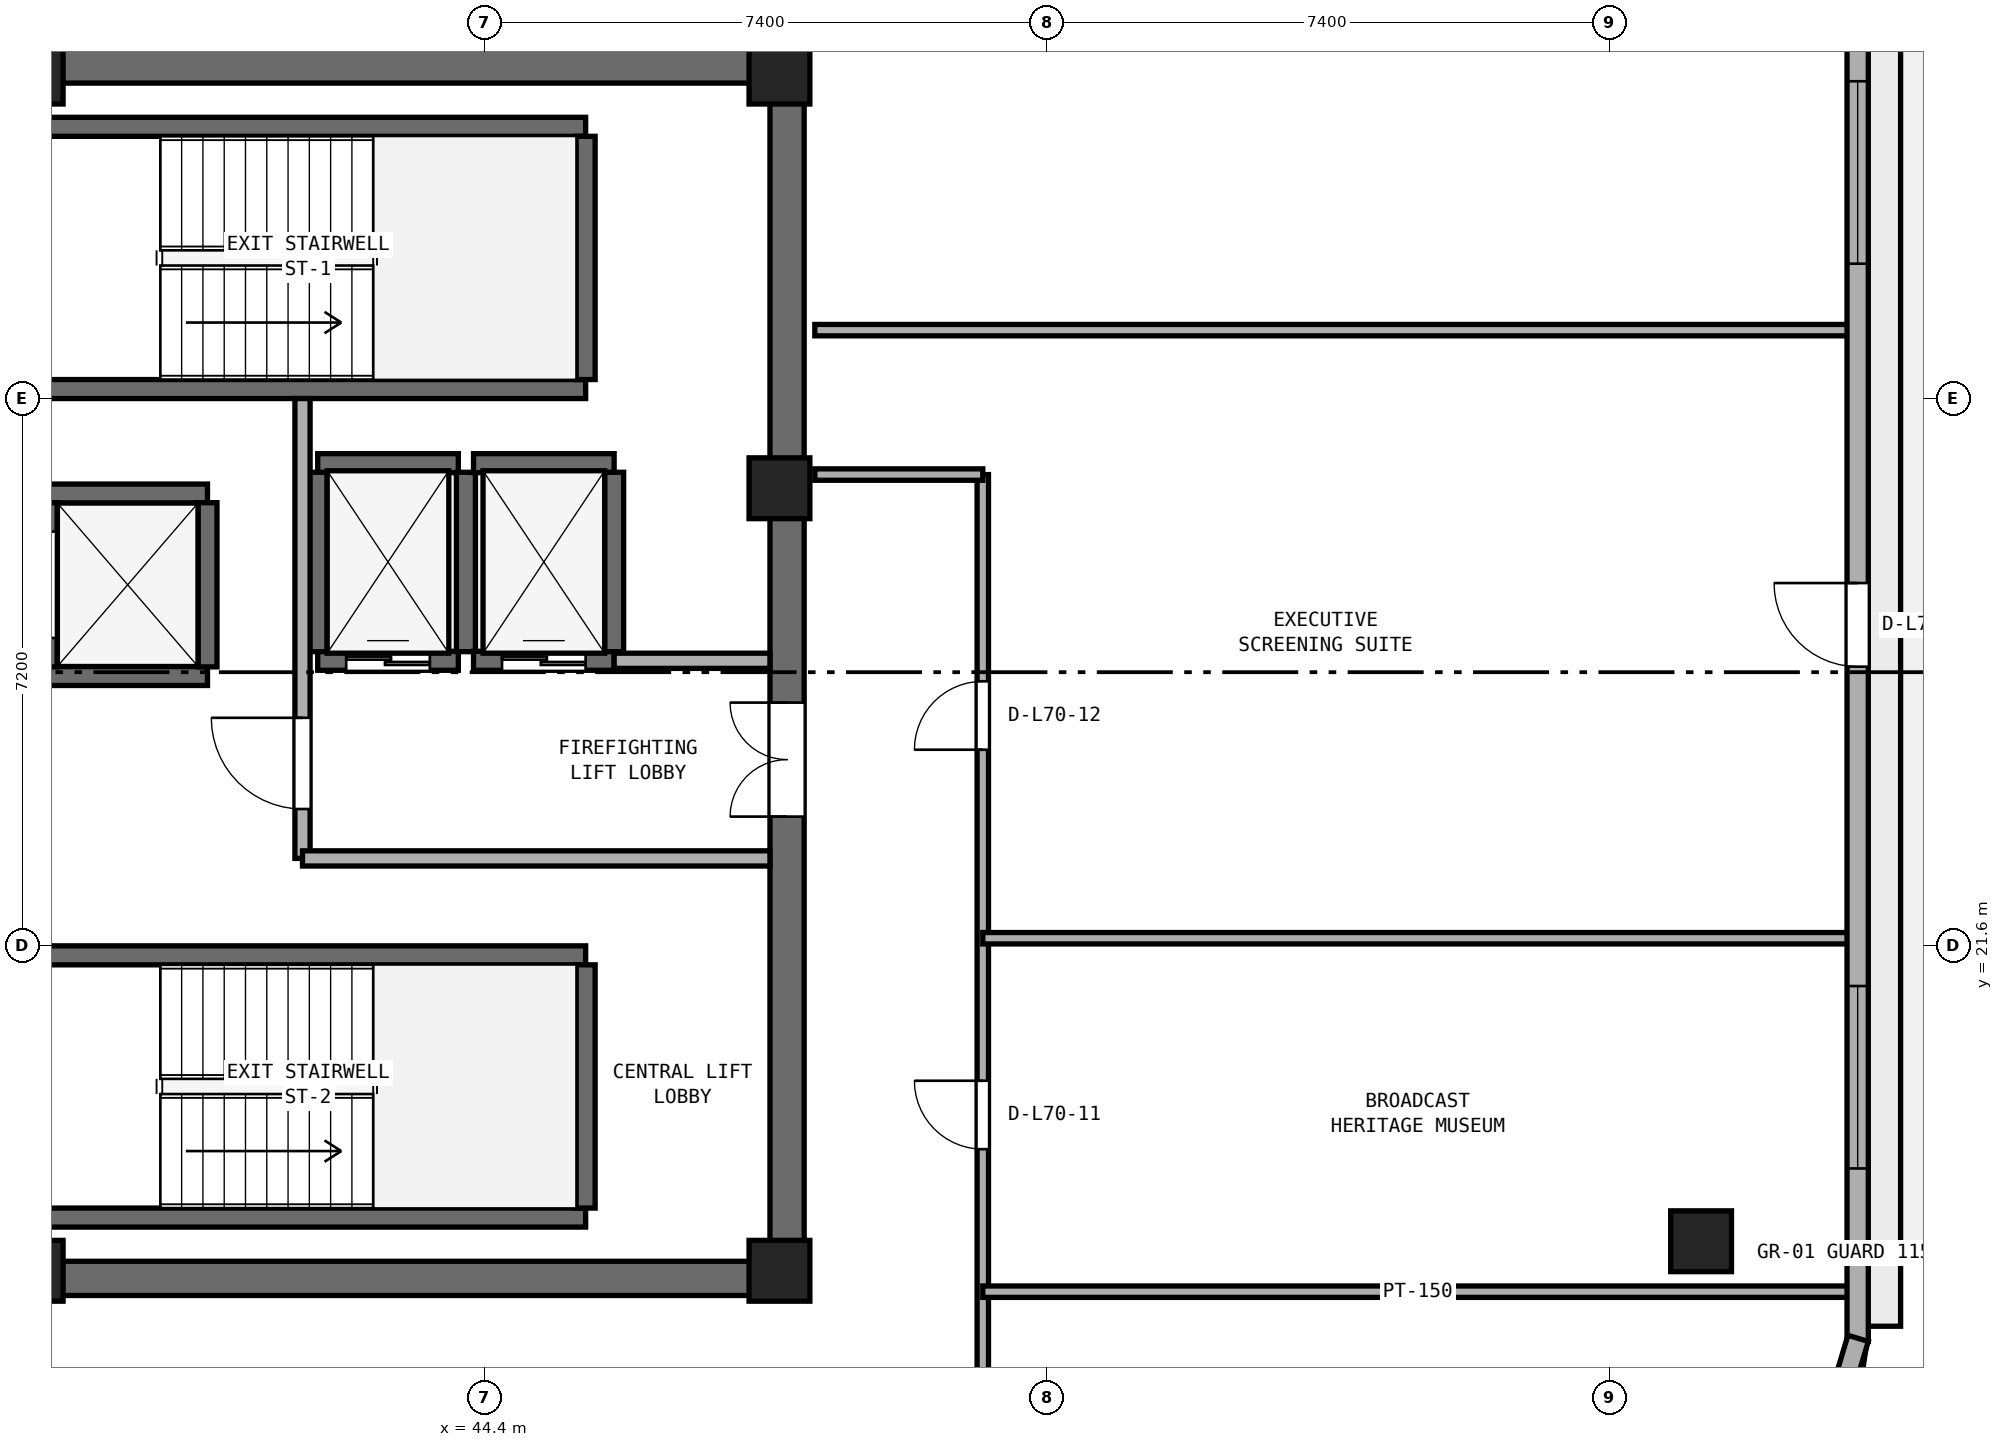
"""IFC4 building model, lengths in metres.
Left out: names, types, materials, properties, quantities, classifications, styles, units other than length and angle.
Written with IfcOpenShell. Run it as: python <this file> out.ifc"""

import sys

from ifc_helpers import new_model, si_unit, direction, frame, frame_2d, origin, origin_2d, place, context, subcontext, project, spatial, rectangle, extrude, element, fill, save


model = new_model("IFC4")
c1 = context("Model", 3, precision=1e-05, world=origin(), true_north=direction((0.0, 1.0)))
c2 = subcontext(c1, "Body", "Model", "MODEL_VIEW")
j1 = project(units=[si_unit("LENGTHUNIT", "METRE"), si_unit("PLANEANGLEUNIT", "RADIAN")], contexts=[c1])
p1 = place(None, origin())
s1 = spatial("IfcSite", under=j1, at=p1, CompositionType="ELEMENT")
p2 = place(p1, origin())
s2 = spatial("IfcBuilding", under=s1, at=p2, CompositionType="ELEMENT")
p3 = place(p2, frame((0.0, 0.0, 274.4)))
s3 = spatial("IfcBuildingStorey", under=s2, at=p3, CompositionType="ELEMENT", Elevation=274.4)
for number, where, z_axis, x_axis in (
    (1, (25.4, 17.225, 0.0), (0.0, 0.0, 1.0), (1.0, 0.0, 0.0)),
    (2, (25.4, 33.175, 0.0), (0.0, 0.0, 1.0), (1.0, 0.0, 0.0)),
):
    element("IfcWall", number, at=place(p3, frame(where, z_axis=z_axis, x_axis=x_axis)), inside=s3, PredefinedType="SHEAR", context=c2, shape_type="SweptSolid", body=[
        extrude(rectangle(XDim=23.2, YDim=0.45, at=frame_2d((11.6, 0.0))), origin(), (0.0, 0.0, 1.0), 3.54),
    ])
p4 = place(p3, frame((48.375, 17.45, 0.0), z_axis=(0.0, 0.0, 1.0), x_axis=(0.0, 1.0, 0.0)))
e3 = element("IfcWall", 3, at=p4, inside=s3, PredefinedType="SHEAR", context=c2, shape_type="SweptSolid", body=[
    extrude(rectangle(XDim=15.5, YDim=0.45, at=frame_2d((7.75, 0.0))), origin(), (0.0, 0.0, 1.0), 3.54),
])
p5 = place(p4, frame((5.85, 0.0, 0.0)))
e4 = element("IfcOpeningElement", 4, at=p5, cuts=e3, PredefinedType="OPENING", context=c2, shape_type="SweptSolid", body=[
    extrude(rectangle(XDim=1.5, YDim=2.15, at=frame_2d((0.75, 1.075))), frame((0.0, 0.235, 0.0), z_axis=(0.0, -1.0, 0.0), x_axis=(1.0, 0.0, 0.0)), (0.0, 0.0, 1.0), 0.47),
])
for number, where, z_axis, x_axis in (
    (5, (38.45, 17.325, 0.0), (0.0, 0.0, 1.0), (1.0, 0.0, 0.0)),
    (6, (48.275, 17.325, 0.0), (0.0, 0.0, 1.0), (1.0, 0.0, 0.0)),
    (7, (48.275, 27.62, 0.0), (0.0, 0.0, 1.0), (1.0, 0.0, 0.0)),
    (8, (48.275, 33.075, 0.0), (0.0, 0.0, 1.0), (1.0, 0.0, 0.0)),
    (9, (38.45, 33.075, 0.0), (0.0, 0.0, 1.0), (1.0, 0.0, 0.0)),
):
    element("IfcColumn", number, at=place(p3, frame(where, z_axis=z_axis, x_axis=x_axis)), inside=s3, PredefinedType="PILASTER", context=c2, shape_type="SweptSolid", body=[
        extrude(rectangle(XDim=0.8, YDim=0.8, at=origin_2d()), origin(), (0.0, 0.0, 1.0), 3.8),
    ])
p6 = place(p3, frame((60.4, 17.714, 0.0), z_axis=(0.0, 0.0, 1.0), x_axis=(1.0, 0.0, 0.0)))
e10 = element("IfcColumn", 10, at=p6, inside=s3, PredefinedType="COLUMN", context=c2, shape_type="SweptSolid", body=[
    extrude(rectangle(XDim=0.8, YDim=0.8, at=origin_2d()), origin(), (0.0, 0.0, 1.0), 3.8),
])
for number, where, z_axis, x_axis in (
    (11, (38.425, 28.925, 0.0), (0.0, 0.0, 1.0), (1.0, 0.0, 0.0)),
    (12, (38.425, 32.375, 0.0), (0.0, 0.0, 1.0), (1.0, 0.0, 0.0)),
):
    element("IfcWall", number, at=place(p3, frame(where, z_axis=z_axis, x_axis=x_axis)), inside=s3, PredefinedType="SHEAR", context=c2, shape_type="SweptSolid", body=[
        extrude(rectangle(XDim=7.3, YDim=0.25, at=frame_2d((3.65, 0.0))), origin(), (0.0, 0.0, 1.0), 3.54),
    ])
p7 = place(p3, frame((45.725, 29.05, 0.0), z_axis=(0.0, 0.0, 1.0), x_axis=(0.0, 1.0, 0.0)))
e13 = element("IfcWall", 13, at=p7, inside=s3, PredefinedType="SHEAR", context=c2, shape_type="SweptSolid", body=[
    extrude(rectangle(XDim=3.2, YDim=0.25, at=frame_2d((1.6, 0.0))), origin(), (0.0, 0.0, 1.0), 3.54),
])
for number, where, z_axis, x_axis in (
    (14, (38.425, 18.025, 0.0), (0.0, 0.0, 1.0), (1.0, 0.0, 0.0)),
    (15, (38.425, 21.475, 0.0), (0.0, 0.0, 1.0), (1.0, 0.0, 0.0)),
):
    element("IfcWall", number, at=place(p3, frame(where, z_axis=z_axis, x_axis=x_axis)), inside=s3, PredefinedType="SHEAR", context=c2, shape_type="SweptSolid", body=[
        extrude(rectangle(XDim=7.3, YDim=0.25, at=frame_2d((3.65, 0.0))), origin(), (0.0, 0.0, 1.0), 3.54),
    ])
p8 = place(p3, frame((45.725, 18.15, 0.0), z_axis=(0.0, 0.0, 1.0), x_axis=(0.0, 1.0, 0.0)))
e16 = element("IfcWall", 16, at=p8, inside=s3, PredefinedType="SHEAR", context=c2, shape_type="SweptSolid", body=[
    extrude(rectangle(XDim=3.2, YDim=0.25, at=frame_2d((1.6, 0.0))), origin(), (0.0, 0.0, 1.0), 3.54),
])
p9 = place(p3, frame((42.2, 25.35, 0.0), z_axis=(0.0, 0.0, 1.0), x_axis=(1.0, 0.0, 0.0)))
e17 = element("IfcWall", 17, at=p9, inside=s3, PredefinedType="SHEAR", context=c2, shape_type="SweptSolid", body=[
    extrude(rectangle(XDim=1.85, YDim=0.25, at=frame_2d((0.925, 0.0))), origin(), (0.0, 0.0, 1.0), 3.54),
])
p10 = place(p9, frame((0.375, 0.0, 0.0)))
e18 = element("IfcOpeningElement", 18, at=p10, cuts=e17, PredefinedType="OPENING", context=c2, shape_type="SweptSolid", body=[
    extrude(rectangle(XDim=1.1, YDim=2.15, at=frame_2d((0.55, 1.075))), frame((0.0, 0.135, 0.0), z_axis=(0.0, -1.0, 0.0), x_axis=(1.0, 0.0, 0.0)), (0.0, 0.0, 1.0), 0.27),
])
p11 = place(p3, frame((42.2, 27.95, 0.0), z_axis=(0.0, 0.0, 1.0), x_axis=(1.0, 0.0, 0.0)))
e19 = element("IfcWall", 19, at=p11, inside=s3, PredefinedType="SHEAR", context=c2, shape_type="SweptSolid", body=[
    extrude(rectangle(XDim=1.85, YDim=0.25, at=frame_2d((0.925, 0.0))), origin(), (0.0, 0.0, 1.0), 3.54),
])
for number, where, z_axis, x_axis in (
    (20, (42.2, 25.47, 0.0), (0.0, 0.0, 1.0), (0.0, 1.0, 0.0)),
    (21, (44.15, 25.47, 0.0), (0.0, 0.0, 1.0), (0.0, 1.0, 0.0)),
):
    element("IfcWall", number, at=place(p3, frame(where, z_axis=z_axis, x_axis=x_axis)), inside=s3, PredefinedType="SHEAR", context=c2, shape_type="SweptSolid", body=[
        extrude(rectangle(XDim=2.36, YDim=0.25, at=frame_2d((1.18, 0.0))), origin(), (0.0, 0.0, 1.0), 3.54),
    ])
p12 = place(p3, frame((44.25, 25.35, 0.0), z_axis=(0.0, 0.0, 1.0), x_axis=(1.0, 0.0, 0.0)))
e22 = element("IfcWall", 22, at=p12, inside=s3, PredefinedType="SHEAR", context=c2, shape_type="SweptSolid", body=[
    extrude(rectangle(XDim=1.85, YDim=0.25, at=frame_2d((0.925, 0.0))), origin(), (0.0, 0.0, 1.0), 3.54),
])
p13 = place(p12, frame((0.375, 0.0, 0.0)))
e23 = element("IfcOpeningElement", 23, at=p13, cuts=e22, PredefinedType="OPENING", context=c2, shape_type="SweptSolid", body=[
    extrude(rectangle(XDim=1.1, YDim=2.15, at=frame_2d((0.55, 1.075))), frame((0.0, 0.135, 0.0), z_axis=(0.0, -1.0, 0.0), x_axis=(1.0, 0.0, 0.0)), (0.0, 0.0, 1.0), 0.27),
])
p14 = place(p3, frame((44.25, 27.95, 0.0), z_axis=(0.0, 0.0, 1.0), x_axis=(1.0, 0.0, 0.0)))
e24 = element("IfcWall", 24, at=p14, inside=s3, PredefinedType="SHEAR", context=c2, shape_type="SweptSolid", body=[
    extrude(rectangle(XDim=1.85, YDim=0.25, at=frame_2d((0.925, 0.0))), origin(), (0.0, 0.0, 1.0), 3.54),
])
p15 = place(p3, frame((46.1, 25.47, 0.0), z_axis=(0.0, 0.0, 1.0), x_axis=(0.0, 1.0, 0.0)))
e25 = element("IfcWall", 25, at=p15, inside=s3, PredefinedType="SHEAR", context=c2, shape_type="SweptSolid", body=[
    extrude(rectangle(XDim=2.36, YDim=0.25, at=frame_2d((1.18, 0.0))), origin(), (0.0, 0.0, 1.0), 3.54),
])
for number, where, z_axis, x_axis in (
    (26, (38.65, 25.15, 0.0), (0.0, 0.0, 1.0), (1.0, 0.0, 0.0)),
    (27, (38.65, 27.55, 0.0), (0.0, 0.0, 1.0), (1.0, 0.0, 0.0)),
):
    element("IfcWall", number, at=place(p3, frame(where, z_axis=z_axis, x_axis=x_axis)), inside=s3, PredefinedType="SHEAR", context=c2, shape_type="SweptSolid", body=[
        extrude(rectangle(XDim=2.1, YDim=0.25, at=frame_2d((1.05, 0.0))), origin(), (0.0, 0.0, 1.0), 3.54),
    ])
p16 = place(p3, frame((38.65, 25.27, 0.0), z_axis=(0.0, 0.0, 1.0), x_axis=(0.0, 1.0, 0.0)))
e28 = element("IfcWall", 28, at=p16, inside=s3, PredefinedType="SHEAR", context=c2, shape_type="SweptSolid", body=[
    extrude(rectangle(XDim=2.16, YDim=0.25, at=frame_2d((1.08, 0.0))), origin(), (0.0, 0.0, 1.0), 3.54),
])
p17 = place(p16, frame((0.38, 0.0, 0.0)))
e29 = element("IfcOpeningElement", 29, at=p17, cuts=e28, PredefinedType="OPENING", context=c2, shape_type="SweptSolid", body=[
    extrude(rectangle(XDim=1.4, YDim=2.2, at=frame_2d((0.7, 1.1))), frame((0.0, 0.135, 0.0), z_axis=(0.0, -1.0, 0.0), x_axis=(1.0, 0.0, 0.0)), (0.0, 0.0, 1.0), 0.27),
])
p18 = place(p3, frame((40.75, 25.27, 0.0), z_axis=(0.0, 0.0, 1.0), x_axis=(0.0, 1.0, 0.0)))
e30 = element("IfcWall", 30, at=p18, inside=s3, PredefinedType="SHEAR", context=c2, shape_type="SweptSolid", body=[
    extrude(rectangle(XDim=2.16, YDim=0.25, at=frame_2d((1.08, 0.0))), origin(), (0.0, 0.0, 1.0), 3.54),
])
p19 = place(p3, frame((42.0, 22.75, 0.0), z_axis=(0.0, 0.0, 1.0), x_axis=(0.0, 1.0, 0.0)))
e31 = element("IfcWall", 31, at=p19, inside=s3, PredefinedType="SOLIDWALL", context=c2, shape_type="SweptSolid", body=[
    extrude(rectangle(XDim=6.05, YDim=0.2, at=frame_2d((3.025, 0.0))), origin(), (0.0, 0.0, 1.0), 3.54),
])
p20 = place(p19, frame((0.65, 0.0, 0.0)))
e32 = element("IfcOpeningElement", 32, at=p20, cuts=e31, PredefinedType="OPENING", context=c2, shape_type="SweptSolid", body=[
    extrude(rectangle(XDim=1.2, YDim=2.15, at=frame_2d((0.6, 1.075))), frame((0.0, 0.11, 0.0), z_axis=(0.0, -1.0, 0.0), x_axis=(1.0, 0.0, 0.0)), (0.0, 0.0, 1.0), 0.22),
])
p21 = place(p3, frame((42.0, 22.75, 0.0), z_axis=(0.0, 0.0, 1.0), x_axis=(1.0, 0.0, 0.0)))
e33 = element("IfcWall", 33, at=p21, inside=s3, PredefinedType="SOLIDWALL", context=c2, shape_type="SweptSolid", body=[
    extrude(rectangle(XDim=6.15, YDim=0.2, at=frame_2d((3.075, 0.0))), origin(), (0.0, 0.0, 1.0), 3.54),
])
p22 = place(p3, frame((46.1, 25.35, 0.0), z_axis=(0.0, 0.0, 1.0), x_axis=(1.0, 0.0, 0.0)))
e34 = element("IfcWall", 34, at=p22, inside=s3, PredefinedType="SOLIDWALL", context=c2, shape_type="SweptSolid", body=[
    extrude(rectangle(XDim=2.05, YDim=0.2, at=frame_2d((1.025, 0.0))), origin(), (0.0, 0.0, 1.0), 3.54),
])
p23 = place(p3, frame((50.95, 14.65, 0.0), z_axis=(0.0, 0.0, 1.0), x_axis=(0.0, 1.0, 0.0)))
e35 = element("IfcWall", 35, at=p23, inside=s3, PredefinedType="PARTITIONING", context=c2, shape_type="SweptSolid", body=[
    extrude(rectangle(XDim=13.15, YDim=0.15, at=frame_2d((6.575, 0.0))), origin(), (0.0, 0.0, 1.0), 3.54),
])
p24 = place(p23, frame((4.275, 0.0, 0.0)))
e36 = element("IfcOpeningElement", 36, at=p24, cuts=e35, PredefinedType="OPENING", context=c2, shape_type="SweptSolid", body=[
    extrude(rectangle(XDim=0.9, YDim=2.1, at=frame_2d((0.45, 1.05))), frame((0.0, 0.085, 0.0), z_axis=(0.0, -1.0, 0.0), x_axis=(1.0, 0.0, 0.0)), (0.0, 0.0, 1.0), 0.17),
])
p25 = place(p23, frame((9.53, 0.0, 0.0)))
e37 = element("IfcOpeningElement", 37, at=p25, cuts=e35, PredefinedType="OPENING", context=c2, shape_type="SweptSolid", body=[
    extrude(rectangle(XDim=0.9, YDim=2.1, at=frame_2d((0.45, 1.05))), frame((0.0, 0.085, 0.0), z_axis=(0.0, -1.0, 0.0), x_axis=(1.0, 0.0, 0.0)), (0.0, 0.0, 1.0), 0.17),
])
for number, where, z_axis, x_axis in (
    (38, (50.95, 17.05, 0.0), (0.0, 0.0, 1.0), (1.0, 0.0, 0.0)),
    (39, (50.95, 21.7, 0.0), (0.0, 0.0, 1.0), (1.0, 0.0, 0.0)),
):
    element("IfcWall", number, at=place(p3, frame(where, z_axis=z_axis, x_axis=x_axis)), inside=s3, PredefinedType="PARTITIONING", context=c2, shape_type="SweptSolid", body=[
        extrude(rectangle(XDim=11.445, YDim=0.15, at=frame_2d((5.723, 0.0))), origin(), (0.0, 0.0, 1.0), 3.54),
    ])
p26 = place(p3, frame((48.74, 27.8, 0.0), z_axis=(0.0, 0.0, 1.0), x_axis=(1.0, 0.0, 0.0)))
e40 = element("IfcWall", 40, at=p26, inside=s3, PredefinedType="PARTITIONING", context=c2, shape_type="SweptSolid", body=[
    extrude(rectangle(XDim=2.21, YDim=0.15, at=frame_2d((1.105, 0.0))), origin(), (0.0, 0.0, 1.0), 3.54),
])
p27 = place(p3, frame((48.74, 29.7, 0.0), z_axis=(0.0, 0.0, 1.0), x_axis=(1.0, 0.0, 0.0)))
e41 = element("IfcWall", 41, at=p27, inside=s3, PredefinedType="PARTITIONING", context=c2, shape_type="SweptSolid", body=[
    extrude(rectangle(XDim=13.655, YDim=0.15, at=frame_2d((6.828, 0.0))), origin(), (0.0, 0.0, 1.0), 3.54),
])
p28 = place(p3, frame((62.46, 16.396, 0.0), z_axis=(0.0, 0.0, 1.0), x_axis=(0.0, 1.0, 0.0)))
e42 = element("IfcWall", 42, at=p28, inside=s3, PredefinedType="STANDARD", context=c2, shape_type="SweptSolid", body=[
    extrude(rectangle(XDim=18.854, YDim=0.28, at=frame_2d((9.427, 0.0))), origin(), (0.0, 0.0, 1.0), 3.54),
])
p29 = place(p28, frame((8.877, 0.0, 0.0)))
e43 = element("IfcOpeningElement", 43, at=p29, cuts=e42, PredefinedType="OPENING", context=c2, shape_type="SweptSolid", body=[
    extrude(rectangle(XDim=1.1, YDim=2.2, at=frame_2d((0.55, 1.1))), frame((0.0, 0.15, 0.0), z_axis=(0.0, -1.0, 0.0), x_axis=(1.0, 0.0, 0.0)), (0.0, 0.0, 1.0), 0.3),
])
p30 = place(p28, frame((2.276, 0.0, 0.9)))
e44 = element("IfcOpeningElement", 44, at=p30, cuts=e42, PredefinedType="OPENING", context=c2, shape_type="SweptSolid", body=[
    extrude(rectangle(XDim=2.4, YDim=1.75, at=frame_2d((1.2, 0.875))), frame((0.0, 0.15, 0.0), z_axis=(0.0, -1.0, 0.0), x_axis=(1.0, 0.0, 0.0)), (0.0, 0.0, 1.0), 0.3),
])
p31 = place(p28, frame((14.179, 0.0, 0.9)))
e45 = element("IfcOpeningElement", 45, at=p31, cuts=e42, PredefinedType="OPENING", context=c2, shape_type="SweptSolid", body=[
    extrude(rectangle(XDim=2.4, YDim=1.75, at=frame_2d((1.2, 0.875))), frame((0.0, 0.15, 0.0), z_axis=(0.0, -1.0, 0.0), x_axis=(1.0, 0.0, 0.0)), (0.0, 0.0, 1.0), 0.3),
])
p32 = place(p3, frame((61.839, 14.344, 0.0), z_axis=(0.0, 0.0, 1.0), x_axis=(0.287235049694, 0.957860128739, 0.0)))
e46 = element("IfcWall", 46, at=p32, inside=s3, PredefinedType="STANDARD", context=c2, shape_type="SweptSolid", body=[
    extrude(rectangle(XDim=2.184, YDim=0.28, at=frame_2d((1.092, 0.0))), origin(), (0.0, 0.0, 1.0), 3.54),
])
p33 = place(p10, origin())
e47 = element("IfcDoor", 47, at=p33, inside=s3, OperationType="DOUBLE_DOOR_SLIDING", PredefinedType="DOOR", context=c2, shape_type="SweptSolid", body=[
    extrude(rectangle(XDim=1.1, YDim=2.15, at=frame_2d((0.55, 1.075))), frame((0.0, 0.025, 0.0), z_axis=(0.0, -1.0, 0.0), x_axis=(1.0, 0.0, 0.0)), (0.0, 0.0, 1.0), 0.05),
])
fill(e18, e47)
p34 = place(p13, origin())
e48 = element("IfcDoor", 48, at=p34, inside=s3, OperationType="DOUBLE_DOOR_SLIDING", PredefinedType="DOOR", context=c2, shape_type="SweptSolid", body=[
    extrude(rectangle(XDim=1.1, YDim=2.15, at=frame_2d((0.55, 1.075))), frame((0.0, 0.025, 0.0), z_axis=(0.0, -1.0, 0.0), x_axis=(1.0, 0.0, 0.0)), (0.0, 0.0, 1.0), 0.05),
])
fill(e23, e48)
p35 = place(p20, origin())
e49 = element("IfcDoor", 49, at=p35, inside=s3, OperationType="SINGLE_SWING_RIGHT", PredefinedType="DOOR", context=c2, shape_type="SweptSolid", body=[
    extrude(rectangle(XDim=1.2, YDim=2.15, at=frame_2d((0.6, 1.075))), frame((0.0, 0.025, 0.0), z_axis=(0.0, -1.0, 0.0), x_axis=(1.0, 0.0, 0.0)), (0.0, 0.0, 1.0), 0.05),
])
fill(e32, e49)
p36 = place(p5, origin())
e50 = element("IfcDoor", 50, at=p36, inside=s3, OperationType="DOUBLE_DOOR_SINGLE_SWING", PredefinedType="DOOR", context=c2, shape_type="SweptSolid", body=[
    extrude(rectangle(XDim=1.5, YDim=2.15, at=frame_2d((0.75, 1.075))), frame((0.0, 0.025, 0.0), z_axis=(0.0, -1.0, 0.0), x_axis=(1.0, 0.0, 0.0)), (0.0, 0.0, 1.0), 0.05),
])
fill(e4, e50)
p37 = place(p24, origin())
e51 = element("IfcDoor", 51, at=p37, inside=s3, OperationType="SINGLE_SWING_RIGHT", PredefinedType="DOOR", context=c2, shape_type="SweptSolid", body=[
    extrude(rectangle(XDim=0.9, YDim=2.1, at=frame_2d((0.45, 1.05))), frame((0.0, 0.025, 0.0), z_axis=(0.0, -1.0, 0.0), x_axis=(1.0, 0.0, 0.0)), (0.0, 0.0, 1.0), 0.05),
])
fill(e36, e51)
p38 = place(p25, origin())
e52 = element("IfcDoor", 52, at=p38, inside=s3, OperationType="SINGLE_SWING_LEFT", PredefinedType="DOOR", context=c2, shape_type="SweptSolid", body=[
    extrude(rectangle(XDim=0.9, YDim=2.1, at=frame_2d((0.45, 1.05))), frame((0.0, 0.025, 0.0), z_axis=(0.0, -1.0, 0.0), x_axis=(1.0, 0.0, 0.0)), (0.0, 0.0, 1.0), 0.05),
])
fill(e37, e52)
p39 = place(p29, origin())
e53 = element("IfcDoor", 53, at=p39, inside=s3, OperationType="SINGLE_SWING_RIGHT", PredefinedType="DOOR", context=c2, shape_type="SweptSolid", body=[
    extrude(rectangle(XDim=1.1, YDim=2.2, at=frame_2d((0.55, 1.1))), frame((0.0, 0.025, 0.0), z_axis=(0.0, -1.0, 0.0), x_axis=(1.0, 0.0, 0.0)), (0.0, 0.0, 1.0), 0.05),
])
fill(e43, e53)
p40 = place(p30, origin())
e54 = element("IfcWindow", 54, at=p40, inside=s3, PartitioningType="SINGLE_PANEL", PredefinedType="WINDOW", context=c2, shape_type="SweptSolid", body=[
    extrude(rectangle(XDim=2.4, YDim=1.75, at=frame_2d((1.2, 0.875))), frame((0.0, 0.03, 0.0), z_axis=(0.0, -1.0, 0.0), x_axis=(1.0, 0.0, 0.0)), (0.0, 0.0, 1.0), 0.06),
])
fill(e44, e54)
p41 = place(p31, origin())
e55 = element("IfcWindow", 55, at=p41, inside=s3, PartitioningType="SINGLE_PANEL", PredefinedType="WINDOW", context=c2, shape_type="SweptSolid", body=[
    extrude(rectangle(XDim=2.4, YDim=1.75, at=frame_2d((1.2, 0.875))), frame((0.0, 0.03, 0.0), z_axis=(0.0, -1.0, 0.0), x_axis=(1.0, 0.0, 0.0)), (0.0, 0.0, 1.0), 0.06),
])
fill(e45, e55)
save(model, sys.argv[1])
